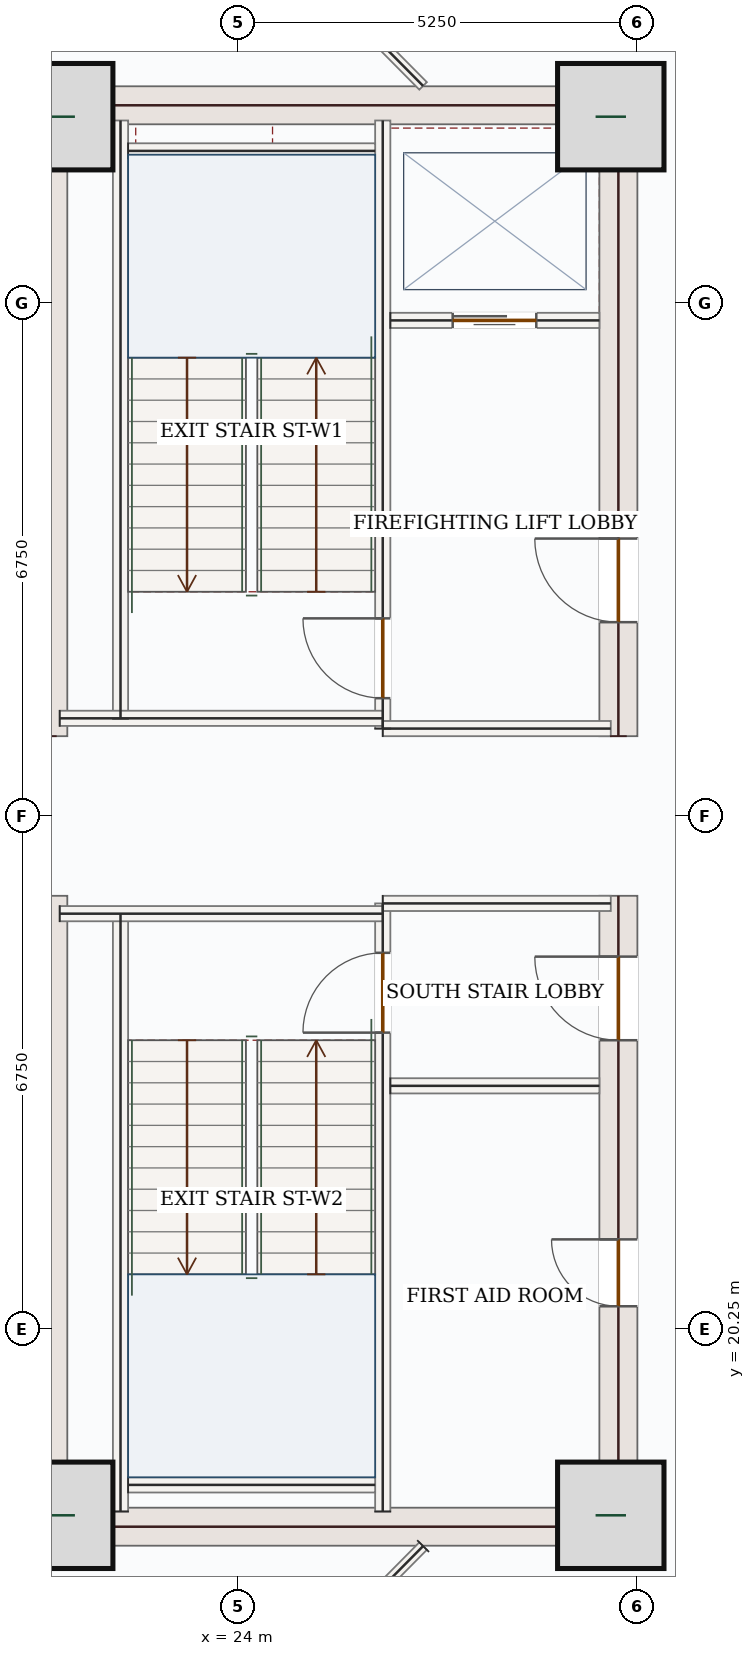
"""IFC4 building model, lengths in metres.
Left out: names, types, materials, properties, quantities, classifications, styles, units other than length and angle.
Written with IfcOpenShell. Run it as: python <this file> out.ifc"""

import sys

from ifc_helpers import new_model, si_unit, direction, frame, frame_2d, origin, origin_2d, place, context, subcontext, project, spatial, rectangle, extrude, source, transform, mapped, element, fill, save


model = new_model("IFC4")
c1 = context("Model", 3, precision=1e-05, world=origin(), true_north=direction((0.0, 1.0)))
c2 = subcontext(c1, "Body", "Model", "MODEL_VIEW")
j1 = project(units=[si_unit("LENGTHUNIT", "METRE"), si_unit("PLANEANGLEUNIT", "RADIAN")], contexts=[c1])
p1 = place(None, origin())
s1 = spatial("IfcSite", under=j1, at=p1, CompositionType="ELEMENT")
p2 = place(p1, origin())
s2 = spatial("IfcBuilding", under=s1, at=p2, CompositionType="ELEMENT")
p3 = place(p2, frame((0.0, 0.0, 37.5)))
s3 = spatial("IfcBuildingStorey", under=s2, at=p3, CompositionType="ELEMENT", Elevation=37.5)
m1 = source(origin(), c2, "Body", "SweptSolid", [
    extrude(rectangle(XDim=8.55, YDim=0.5, at=frame_2d((4.275, 0.0))), origin(), (0.0, 0.0, 1.0), 3.95),
])
for number, where, z_axis, x_axis in (
    (1, (21.5, 17.4, 0.0), (0.0, 0.0, 1.0), (0.0, 1.0, 0.0)),
    (2, (21.5, 28.05, 0.0), (0.0, 0.0, 1.0), (0.0, 1.0, 0.0)),
):
    element("IfcWall", number, at=place(p3, frame(where, z_axis=z_axis, x_axis=x_axis)), inside=s3, PredefinedType="SHEAR", context=c2, shape_type="MappedRepresentation", body=[
        mapped(m1, transform((0.0, 0.0, 0.0), x_axis=(1.0, 0.0, 0.0), y_axis=(0.0, 1.0, 0.0), z_axis=(0.0, 0.0, 1.0), scale=1.0)),
    ])
p4 = place(p3, frame((29.0, 17.4, 0.0), z_axis=(0.0, 0.0, 1.0), x_axis=(0.0, 1.0, 0.0)))
e3 = element("IfcWall", 3, at=p4, inside=s3, PredefinedType="SHEAR", context=c2, shape_type="SweptSolid", body=[
    extrude(rectangle(XDim=8.55, YDim=0.5, at=frame_2d((4.275, 0.0))), origin(), (0.0, 0.0, 1.0), 3.95),
])
p5 = place(p4, frame((6.65, 0.0, 0.0)))
e4 = element("IfcOpeningElement", 4, at=p5, cuts=e3, PredefinedType="OPENING", context=c2, shape_type="SweptSolid", body=[
    extrude(rectangle(XDim=1.1, YDim=2.2, at=frame_2d((0.55, 1.1))), frame((0.0, 0.26, 0.0), z_axis=(0.0, -1.0, 0.0), x_axis=(1.0, 0.0, 0.0)), (0.0, 0.0, 1.0), 0.52),
])
p6 = place(p4, frame((3.15, 0.0, 0.0)))
e5 = element("IfcOpeningElement", 5, at=p6, cuts=e3, PredefinedType="OPENING", context=c2, shape_type="SweptSolid", body=[
    extrude(rectangle(XDim=0.88, YDim=2.1, at=frame_2d((0.44, 1.05))), frame((0.0, 0.26, 0.0), z_axis=(0.0, -1.0, 0.0), x_axis=(1.0, 0.0, 0.0)), (0.0, 0.0, 1.0), 0.52),
])
p7 = place(p3, frame((29.0, 28.05, 0.0), z_axis=(0.0, 0.0, 1.0), x_axis=(0.0, 1.0, 0.0)))
e6 = element("IfcWall", 6, at=p7, inside=s3, PredefinedType="SHEAR", context=c2, shape_type="SweptSolid", body=[
    extrude(rectangle(XDim=8.55, YDim=0.5, at=frame_2d((4.275, 0.0))), origin(), (0.0, 0.0, 1.0), 3.95),
])
p8 = place(p7, frame((1.5, 0.0, 0.0)))
e7 = element("IfcOpeningElement", 7, at=p8, cuts=e6, PredefinedType="OPENING", context=c2, shape_type="SweptSolid", body=[
    extrude(rectangle(XDim=1.1, YDim=2.2, at=frame_2d((0.55, 1.1))), frame((0.0, 0.26, 0.0), z_axis=(0.0, -1.0, 0.0), x_axis=(1.0, 0.0, 0.0)), (0.0, 0.0, 1.0), 0.52),
])
m2 = source(origin(), c2, "Body", "SweptSolid", [
    extrude(rectangle(XDim=7.0, YDim=0.5, at=frame_2d((3.5, 0.0))), origin(), (0.0, 0.0, 1.0), 3.95),
])
for number, where, z_axis, x_axis in (
    (8, (21.75, 17.65, 0.0), (0.0, 0.0, 1.0), (1.0, 0.0, 0.0)),
    (9, (21.75, 36.35, 0.0), (0.0, 0.0, 1.0), (1.0, 0.0, 0.0)),
):
    element("IfcWall", number, at=place(p3, frame(where, z_axis=z_axis, x_axis=x_axis)), inside=s3, PredefinedType="SHEAR", context=c2, shape_type="MappedRepresentation", body=[
        mapped(m2, transform((0.0, 0.0, 0.0), x_axis=(1.0, 0.0, 0.0), y_axis=(0.0, 1.0, 0.0), z_axis=(0.0, 0.0, 1.0), scale=1.0)),
    ])
m3 = source(origin(), c2, "Body", "SweptSolid", [
    extrude(rectangle(XDim=1.4, YDim=1.4, at=origin_2d()), origin(), (0.0, 0.0, 1.0), 4.2),
])
for number, where, z_axis, x_axis in (
    (10, (21.65, 17.8, 0.0), (0.0, 0.0, 1.0), (1.0, 0.0, 0.0)),
    (11, (28.9, 17.8, 0.0), (0.0, 0.0, 1.0), (1.0, 0.0, 0.0)),
    (12, (21.65, 36.2, 0.0), (0.0, 0.0, 1.0), (1.0, 0.0, 0.0)),
    (13, (28.9, 36.2, 0.0), (0.0, 0.0, 1.0), (1.0, 0.0, 0.0)),
):
    element("IfcColumn", number, at=place(p3, frame(where, z_axis=z_axis, x_axis=x_axis)), inside=s3, PredefinedType="COLUMN", context=c2, shape_type="MappedRepresentation", body=[
        mapped(m3, transform((0.0, 0.0, 0.0), x_axis=(1.0, 0.0, 0.0), y_axis=(0.0, 1.0, 0.0), z_axis=(0.0, 0.0, 1.0), scale=1.0)),
    ])
p9 = place(p3, frame((22.658, 14.74, 0.0), z_axis=(0.0, 0.0, 1.0), x_axis=(-0.707106781187, 0.707106781187, 0.0)))
e14 = element("IfcWall", 14, at=p9, inside=s3, PredefinedType="SOLIDWALL", context=c2, shape_type="SweptSolid", body=[
    extrude(rectangle(XDim=5.258, YDim=0.32, at=frame_2d((2.629, 0.0))), origin(), (0.0, 0.0, 1.0), 3.95),
])
p10 = place(p9, frame((1.429, 0.0, 0.85)))
e15 = element("IfcOpeningElement", 15, at=p10, cuts=e14, PredefinedType="OPENING", context=c2, shape_type="SweptSolid", body=[
    extrude(rectangle(XDim=2.4, YDim=1.8, at=frame_2d((1.2, 0.9))), frame((0.0, 0.17, 0.0), z_axis=(0.0, -1.0, 0.0), x_axis=(1.0, 0.0, 0.0)), (0.0, 0.0, 1.0), 0.34),
])
m4 = source(origin(), c2, "Body", "SweptSolid", [
    extrude(rectangle(XDim=5.258, YDim=0.32, at=frame_2d((2.629, 0.0))), origin(), (0.0, 0.0, 1.0), 3.95),
])
p11 = place(p3, frame((18.94, 35.542, 0.0), z_axis=(0.0, 0.0, 1.0), x_axis=(0.707106781187, 0.707106781187, 0.0)))
e16 = element("IfcWall", 16, at=p11, inside=s3, PredefinedType="SOLIDWALL", context=c2, shape_type="MappedRepresentation", body=[
    mapped(m4, transform((0.0, 0.0, 0.0), x_axis=(1.0, 0.0, 0.0), y_axis=(0.0, 1.0, 0.0), z_axis=(0.0, 0.0, 1.0), scale=1.0)),
])
m5 = source(origin(), c2, "Body", "SweptSolid", [
    extrude(rectangle(XDim=7.87, YDim=0.2, at=frame_2d((3.935, 0.0))), origin(), (0.0, 0.0, 1.0), 3.95),
])
for number, where, z_axis, x_axis in (
    (17, (22.45, 17.85, 0.0), (0.0, 0.0, 1.0), (0.0, 1.0, 0.0)),
    (18, (22.45, 28.28, 0.0), (0.0, 0.0, 1.0), (0.0, 1.0, 0.0)),
):
    element("IfcWall", number, at=place(p3, frame(where, z_axis=z_axis, x_axis=x_axis)), inside=s3, PredefinedType="SOLIDWALL", context=c2, shape_type="MappedRepresentation", body=[
        mapped(m5, transform((0.0, 0.0, 0.0), x_axis=(1.0, 0.0, 0.0), y_axis=(0.0, 1.0, 0.0), z_axis=(0.0, 0.0, 1.0), scale=1.0)),
    ])
p12 = place(p3, frame((25.9, 17.85, 0.0), z_axis=(0.0, 0.0, 1.0), x_axis=(0.0, 1.0, 0.0)))
e19 = element("IfcWall", 19, at=p12, inside=s3, PredefinedType="SOLIDWALL", context=c2, shape_type="SweptSolid", body=[
    extrude(rectangle(XDim=8.0, YDim=0.2, at=frame_2d((4.0, 0.0))), origin(), (0.0, 0.0, 1.0), 3.95),
])
p13 = place(p12, frame((6.3, 0.0, 0.0)))
e20 = element("IfcOpeningElement", 20, at=p13, cuts=e19, PredefinedType="OPENING", context=c2, shape_type="SweptSolid", body=[
    extrude(rectangle(XDim=1.05, YDim=2.15, at=frame_2d((0.525, 1.075))), frame((0.0, 0.11, 0.0), z_axis=(0.0, -1.0, 0.0), x_axis=(1.0, 0.0, 0.0)), (0.0, 0.0, 1.0), 0.22),
])
p14 = place(p3, frame((25.9, 28.15, 0.0), z_axis=(0.0, 0.0, 1.0), x_axis=(0.0, 1.0, 0.0)))
e21 = element("IfcWall", 21, at=p14, inside=s3, PredefinedType="SOLIDWALL", context=c2, shape_type="SweptSolid", body=[
    extrude(rectangle(XDim=8.0, YDim=0.2, at=frame_2d((4.0, 0.0))), origin(), (0.0, 0.0, 1.0), 3.95),
])
p15 = place(p14, frame((0.4, 0.0, 0.0)))
e22 = element("IfcOpeningElement", 22, at=p15, cuts=e21, PredefinedType="OPENING", context=c2, shape_type="SweptSolid", body=[
    extrude(rectangle(XDim=1.05, YDim=2.15, at=frame_2d((0.525, 1.075))), frame((0.0, 0.11, 0.0), z_axis=(0.0, -1.0, 0.0), x_axis=(1.0, 0.0, 0.0)), (0.0, 0.0, 1.0), 0.22),
])
m6 = source(origin(), c2, "Body", "SweptSolid", [
    extrude(rectangle(XDim=4.25, YDim=0.2, at=frame_2d((2.125, 0.0))), origin(), (0.0, 0.0, 1.0), 3.95),
])
p16 = place(p3, frame((21.65, 25.715, 0.0), z_axis=(0.0, 0.0, 1.0), x_axis=(1.0, 0.0, 0.0)))
e23 = element("IfcWall", 23, at=p16, inside=s3, PredefinedType="SOLIDWALL", context=c2, shape_type="MappedRepresentation", body=[
    mapped(m6, transform((0.0, 0.0, 0.0), x_axis=(1.0, 0.0, 0.0), y_axis=(0.0, 1.0, 0.0), z_axis=(0.0, 0.0, 1.0), scale=1.0)),
])
m7 = source(origin(), c2, "Body", "SweptSolid", [
    extrude(rectangle(XDim=3.0, YDim=0.2, at=frame_2d((1.5, 0.0))), origin(), (0.0, 0.0, 1.0), 3.95),
])
p17 = place(p3, frame((25.9, 25.85, 0.0), z_axis=(0.0, 0.0, 1.0), x_axis=(1.0, 0.0, 0.0)))
e24 = element("IfcWall", 24, at=p17, inside=s3, PredefinedType="SOLIDWALL", context=c2, shape_type="MappedRepresentation", body=[
    mapped(m7, transform((0.0, 0.0, 0.0), x_axis=(1.0, 0.0, 0.0), y_axis=(0.0, 1.0, 0.0), z_axis=(0.0, 0.0, 1.0), scale=1.0)),
])
p18 = place(p3, frame((21.65, 28.285, 0.0), z_axis=(0.0, 0.0, 1.0), x_axis=(1.0, 0.0, 0.0)))
e25 = element("IfcWall", 25, at=p18, inside=s3, PredefinedType="SOLIDWALL", context=c2, shape_type="MappedRepresentation", body=[
    mapped(m6, transform((0.0, 0.0, 0.0), x_axis=(1.0, 0.0, 0.0), y_axis=(0.0, 1.0, 0.0), z_axis=(0.0, 0.0, 1.0), scale=1.0)),
])
p19 = place(p3, frame((25.9, 28.15, 0.0), z_axis=(0.0, 0.0, 1.0), x_axis=(1.0, 0.0, 0.0)))
e26 = element("IfcWall", 26, at=p19, inside=s3, PredefinedType="SOLIDWALL", context=c2, shape_type="MappedRepresentation", body=[
    mapped(m7, transform((0.0, 0.0, 0.0), x_axis=(1.0, 0.0, 0.0), y_axis=(0.0, 1.0, 0.0), z_axis=(0.0, 0.0, 1.0), scale=1.0)),
])
m8 = source(origin(), c2, "Body", "SweptSolid", [
    extrude(rectangle(XDim=3.25, YDim=0.2, at=frame_2d((1.625, 0.0))), origin(), (0.0, 0.0, 1.0), 3.95),
])
for number, where, z_axis, x_axis in (
    (27, (22.55, 35.75, 0.0), (0.0, 0.0, 1.0), (1.0, 0.0, 0.0)),
    (28, (22.55, 18.2, 0.0), (0.0, 0.0, 1.0), (1.0, 0.0, 0.0)),
):
    element("IfcWall", number, at=place(p3, frame(where, z_axis=z_axis, x_axis=x_axis)), inside=s3, PredefinedType="SOLIDWALL", context=c2, shape_type="MappedRepresentation", body=[
        mapped(m8, transform((0.0, 0.0, 0.0), x_axis=(1.0, 0.0, 0.0), y_axis=(0.0, 1.0, 0.0), z_axis=(0.0, 0.0, 1.0), scale=1.0)),
    ])
p20 = place(p3, frame((26.0, 33.52, 0.0), z_axis=(0.0, 0.0, 1.0), x_axis=(1.0, 0.0, 0.0)))
e29 = element("IfcWall", 29, at=p20, inside=s3, PredefinedType="SOLIDWALL", context=c2, shape_type="SweptSolid", body=[
    extrude(rectangle(XDim=2.75, YDim=0.2, at=frame_2d((1.375, 0.0))), origin(), (0.0, 0.0, 1.0), 3.95),
])
p21 = place(p20, frame((0.82, 0.0, 0.0)))
e30 = element("IfcOpeningElement", 30, at=p21, cuts=e29, PredefinedType="OPENING", context=c2, shape_type="SweptSolid", body=[
    extrude(rectangle(XDim=1.1, YDim=2.15, at=frame_2d((0.55, 1.075))), frame((0.0, 0.11, 0.0), z_axis=(0.0, -1.0, 0.0), x_axis=(1.0, 0.0, 0.0)), (0.0, 0.0, 1.0), 0.22),
])
m9 = source(origin(), c2, "Body", "SweptSolid", [
    extrude(rectangle(XDim=2.75, YDim=0.2, at=frame_2d((1.375, 0.0))), origin(), (0.0, 0.0, 1.0), 3.95),
])
p22 = place(p3, frame((26.0, 23.45, 0.0), z_axis=(0.0, 0.0, 1.0), x_axis=(1.0, 0.0, 0.0)))
e31 = element("IfcWall", 31, at=p22, inside=s3, PredefinedType="SOLIDWALL", context=c2, shape_type="MappedRepresentation", body=[
    mapped(m9, transform((0.0, 0.0, 0.0), x_axis=(1.0, 0.0, 0.0), y_axis=(0.0, 1.0, 0.0), z_axis=(0.0, 0.0, 1.0), scale=1.0)),
])
m10 = source(origin(), c2, "Body", "SweptSolid", [
    extrude(rectangle(XDim=2.047, YDim=0.14, at=frame_2d((1.024, 0.0))), origin(), (0.0, 0.0, 1.0), 3.95),
])
p23 = place(p3, frame((24.99, 38.059, 0.0), z_axis=(0.0, 0.0, 1.0), x_axis=(0.703819772346, -0.710378580797, 0.0)))
e32 = element("IfcWall", 32, at=p23, inside=s3, PredefinedType="PARTITIONING", context=c2, shape_type="MappedRepresentation", body=[
    mapped(m10, transform((0.0, 0.0, 0.0), x_axis=(1.0, 0.0, 0.0), y_axis=(0.0, 1.0, 0.0), z_axis=(0.0, 0.0, 1.0), scale=1.0)),
])
m11 = source(origin(), c2, "Body", "SweptSolid", [
    extrude(rectangle(XDim=3.505, YDim=0.14, at=frame_2d((1.752, 0.0))), origin(), (0.0, 0.0, 1.0), 3.95),
])
p24 = place(p3, frame((26.431, 17.395, 0.0), z_axis=(0.0, 0.0, 1.0), x_axis=(-0.703790445361, -0.710407635811, 0.0)))
e33 = element("IfcWall", 33, at=p24, inside=s3, PredefinedType="PARTITIONING", context=c2, shape_type="MappedRepresentation", body=[
    mapped(m11, transform((0.0, 0.0, 0.0), x_axis=(1.0, 0.0, 0.0), y_axis=(0.0, 1.0, 0.0), z_axis=(0.0, 0.0, 1.0), scale=1.0)),
])
m12 = source(origin(), c2, "Body", "SweptSolid", [
    extrude(rectangle(XDim=2.4, YDim=1.8, at=frame_2d((1.2, 0.9))), frame((0.0, 0.03, 0.0), z_axis=(0.0, -1.0, 0.0), x_axis=(1.0, 0.0, 0.0)), (0.0, 0.0, 1.0), 0.06),
])
p25 = place(p10, origin())
e34 = element("IfcWindow", 34, at=p25, inside=s3, PartitioningType="DOUBLE_PANEL_VERTICAL", PredefinedType="WINDOW", context=c2, shape_type="MappedRepresentation", body=[
    mapped(m12, transform((0.0, 0.0, 0.0), x_axis=(1.0, 0.0, 0.0), y_axis=(0.0, 1.0, 0.0), z_axis=(0.0, 0.0, 1.0), scale=1.0)),
])
fill(e15, e34)
m13 = source(origin(), c2, "Body", "SweptSolid", [
    extrude(rectangle(XDim=1.05, YDim=2.15, at=frame_2d((0.525, 1.075))), frame((0.0, 0.025, 0.0), z_axis=(0.0, -1.0, 0.0), x_axis=(1.0, 0.0, 0.0)), (0.0, 0.0, 1.0), 0.05),
])
p26 = place(p15, origin())
e35 = element("IfcDoor", 35, at=p26, inside=s3, OperationType="SINGLE_SWING_RIGHT", PredefinedType="DOOR", context=c2, shape_type="MappedRepresentation", body=[
    mapped(m13, transform((0.0, 0.0, 0.0), x_axis=(1.0, 0.0, 0.0), y_axis=(0.0, 1.0, 0.0), z_axis=(0.0, 0.0, 1.0), scale=1.0)),
])
fill(e22, e35)
p27 = place(p13, origin())
e36 = element("IfcDoor", 36, at=p27, inside=s3, OperationType="SINGLE_SWING_LEFT", PredefinedType="DOOR", context=c2, shape_type="MappedRepresentation", body=[
    mapped(m13, transform((0.0, 0.0, 0.0), x_axis=(1.0, 0.0, 0.0), y_axis=(0.0, 1.0, 0.0), z_axis=(0.0, 0.0, 1.0), scale=1.0)),
])
fill(e20, e36)
m14 = source(origin(), c2, "Body", "SweptSolid", [
    extrude(rectangle(XDim=1.1, YDim=2.15, at=frame_2d((0.55, 1.075))), frame((0.0, 0.025, 0.0), z_axis=(0.0, -1.0, 0.0), x_axis=(1.0, 0.0, 0.0)), (0.0, 0.0, 1.0), 0.05),
])
p28 = place(p21, origin())
e37 = element("IfcDoor", 37, at=p28, inside=s3, OperationType="DOUBLE_DOOR_SLIDING", PredefinedType="DOOR", context=c2, shape_type="MappedRepresentation", body=[
    mapped(m14, transform((0.0, 0.0, 0.0), x_axis=(1.0, 0.0, 0.0), y_axis=(0.0, 1.0, 0.0), z_axis=(0.0, 0.0, 1.0), scale=1.0)),
])
fill(e30, e37)
m15 = source(origin(), c2, "Body", "SweptSolid", [
    extrude(rectangle(XDim=1.1, YDim=2.2, at=frame_2d((0.55, 1.1))), frame((0.0, 0.025, 0.0), z_axis=(0.0, -1.0, 0.0), x_axis=(1.0, 0.0, 0.0)), (0.0, 0.0, 1.0), 0.05),
])
p29 = place(p8, origin())
e38 = element("IfcDoor", 38, at=p29, inside=s3, OperationType="SINGLE_SWING_RIGHT", PredefinedType="DOOR", context=c2, shape_type="MappedRepresentation", body=[
    mapped(m15, transform((0.0, 0.0, 0.0), x_axis=(1.0, 0.0, 0.0), y_axis=(0.0, 1.0, 0.0), z_axis=(0.0, 0.0, 1.0), scale=1.0)),
])
fill(e7, e38)
p30 = place(p5, origin())
e39 = element("IfcDoor", 39, at=p30, inside=s3, OperationType="SINGLE_SWING_RIGHT", PredefinedType="DOOR", context=c2, shape_type="MappedRepresentation", body=[
    mapped(m15, transform((0.0, 0.0, 0.0), x_axis=(1.0, 0.0, 0.0), y_axis=(0.0, 1.0, 0.0), z_axis=(0.0, 0.0, 1.0), scale=1.0)),
])
fill(e4, e39)
m16 = source(origin(), c2, "Body", "SweptSolid", [
    extrude(rectangle(XDim=0.88, YDim=2.1, at=frame_2d((0.44, 1.05))), frame((0.0, 0.025, 0.0), z_axis=(0.0, -1.0, 0.0), x_axis=(1.0, 0.0, 0.0)), (0.0, 0.0, 1.0), 0.05),
])
p31 = place(p6, origin())
e40 = element("IfcDoor", 40, at=p31, inside=s3, OperationType="SINGLE_SWING_RIGHT", PredefinedType="DOOR", context=c2, shape_type="MappedRepresentation", body=[
    mapped(m16, transform((0.0, 0.0, 0.0), x_axis=(1.0, 0.0, 0.0), y_axis=(0.0, 1.0, 0.0), z_axis=(0.0, 0.0, 1.0), scale=1.0)),
])
fill(e5, e40)
save(model, sys.argv[1])
